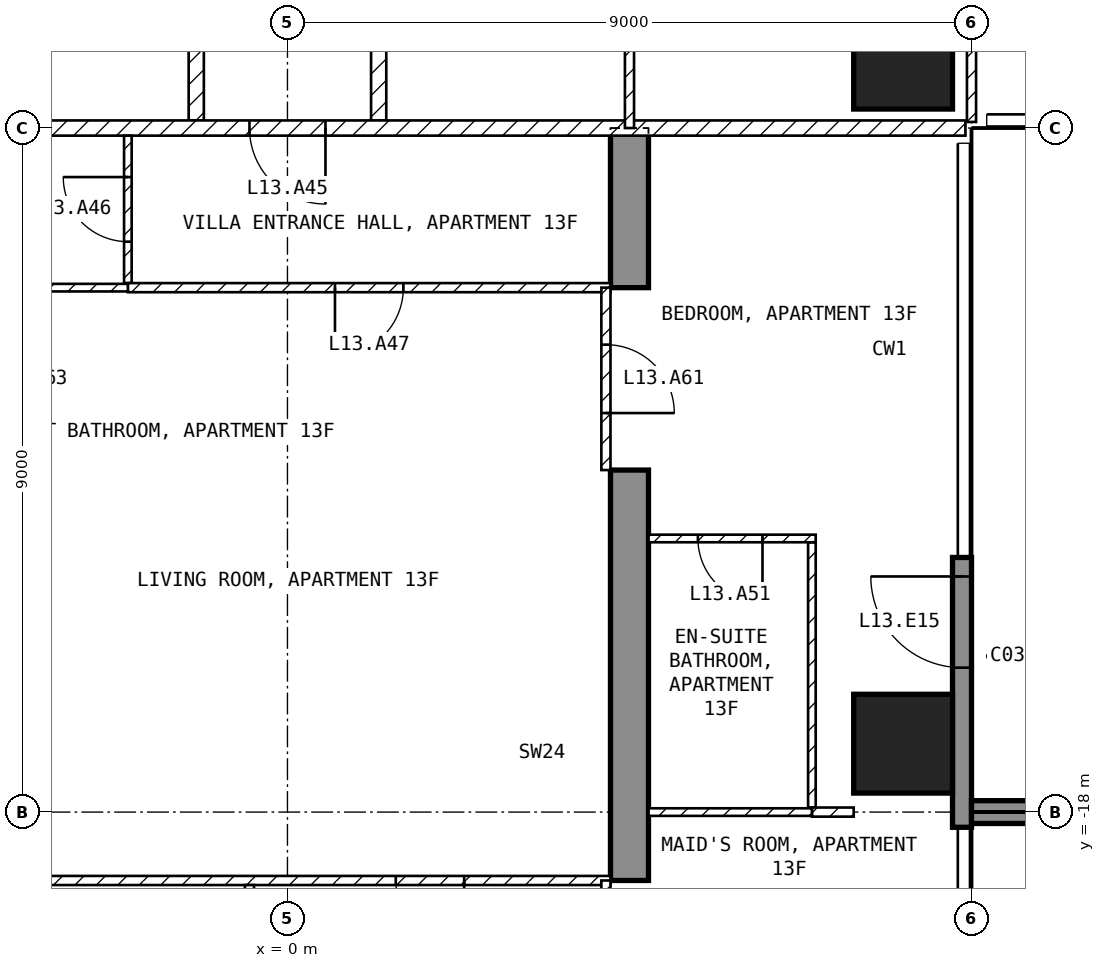
"""IFC4 building model, lengths in metres.
Left out: names, types, materials, properties, quantities, classifications, styles, units other than length and angle.
Written with IfcOpenShell. Run it as: python <this file> out.ifc"""

import sys

from ifc_helpers import new_model, si_unit, direction, frame, frame_2d, origin, origin_2d, place, context, subcontext, project, spatial, polyline, rectangle, outline, extrude, element, fill, save


model = new_model("IFC4")
c1 = context("Model", 3, precision=1e-05, world=origin(), true_north=direction((0.0, 1.0)))
c2 = subcontext(c1, "Body", "Model", "MODEL_VIEW")
j1 = project(units=[si_unit("LENGTHUNIT", "METRE"), si_unit("PLANEANGLEUNIT", "RADIAN")], contexts=[c1])
p1 = place(None, origin())
s1 = spatial("IfcSite", under=j1, at=p1, CompositionType="ELEMENT")
p2 = place(p1, origin())
s2 = spatial("IfcBuilding", under=s1, at=p2, CompositionType="ELEMENT")
p3 = place(p2, frame((0.0, 0.0, 64.5)))
s3 = spatial("IfcBuildingStorey", under=s2, at=p3, CompositionType="ELEMENT", Elevation=64.5)
for number, where, z_axis, x_axis in (
    (1, (8.1, -17.1, -0.25), (0.0, 0.0, 1.0), (1.0, 0.0, 0.0)),
    (2, (8.1, -8.1, -0.25), (0.0, 0.0, 1.0), (1.0, 0.0, 0.0)),
):
    element("IfcColumn", number, at=place(p3, frame(where, z_axis=z_axis, x_axis=x_axis)), inside=s3, PredefinedType="COLUMN", context=c2, shape_type="SweptSolid", body=[
        extrude(rectangle(XDim=1.3, YDim=1.3, at=origin_2d()), origin(), (0.0, 0.0, 1.0), 3.5),
    ])
p4 = place(p3, frame((4.25, -25.45, -0.25), z_axis=(1.0, 0.0, 0.0), x_axis=(0.0, 1.0, 0.0)))
e3 = element("IfcWall", 3, at=p4, inside=s3, PredefinedType="SHEAR", context=c2, shape_type="SweptSolid", body=[
    extrude(outline(polyline([(0.0, 0.0), (4.15, 0.0), (4.15, 2.65), (6.55, 2.65), (6.55, 0.0), (11.95, 0.0), (11.95, 2.65), (14.35, 2.65), (14.35, 0.0), (16.45, 0.0), (16.45, 3.5), (0.0, 3.5), (0.0, 0.0)])), origin(), (0.0, 0.0, 1.0), 0.5),
])
p5 = place(p3, frame((8.875, -18.2, 0.0), z_axis=(0.0, 0.0, 1.0), x_axis=(0.0, 1.0, 0.0)))
e4 = element("IfcWall", 4, at=p5, inside=s3, PredefinedType="SOLIDWALL", context=c2, shape_type="SweptSolid", body=[
    extrude(rectangle(XDim=3.55, YDim=0.25, at=frame_2d((1.775, 0.0))), origin(), (0.0, 0.0, 1.0), 3.25),
])
p6 = place(p5, frame((2.1, 0.0, 0.0)))
e5 = element("IfcOpeningElement", 5, at=p6, cuts=e4, PredefinedType="OPENING", context=c2, shape_type="SweptSolid", body=[
    extrude(rectangle(XDim=1.2, YDim=2.4, at=frame_2d((0.6, 1.2))), frame((0.0, 0.135, 0.0), z_axis=(0.0, -1.0, 0.0), x_axis=(1.0, 0.0, 0.0)), (0.0, 0.0, 1.0), 0.27),
])
p7 = place(p3, frame((9.0, -18.0, 0.0), z_axis=(0.0, 0.0, 1.0), x_axis=(1.0, 0.0, 0.0)))
e6 = element("IfcWall", 6, at=p7, inside=s3, PredefinedType="SOLIDWALL", context=c2, shape_type="SweptSolid", body=[
    extrude(rectangle(XDim=2.7, YDim=0.3, at=frame_2d((1.35, 0.0))), origin(), (0.0, 0.0, 1.0), 3.25),
])
for number, where, z_axis, x_axis in (
    (7, (1.2, -1.3, 0.0), (0.0, 0.0, 1.0), (0.0, -1.0, 0.0)),
    (8, (-1.2, -8.9, 0.0), (0.0, 0.0, 1.0), (0.0, 1.0, 0.0)),
):
    element("IfcWall", number, at=place(p3, frame(where, z_axis=z_axis, x_axis=x_axis)), inside=s3, PredefinedType="PARTITIONING", context=c2, shape_type="SweptSolid", body=[
        extrude(rectangle(XDim=7.6, YDim=0.2, at=frame_2d((3.8, 0.0))), origin(), (0.0, 0.0, 1.0), 3.25),
    ])
p8 = place(p3, frame((8.92, -9.0, 0.0), z_axis=(0.0, 0.0, 1.0), x_axis=(-1.0, 0.0, 0.0)))
e9 = element("IfcWall", 9, at=p8, inside=s3, PredefinedType="PARTITIONING", context=c2, shape_type="SweptSolid", body=[
    extrude(rectangle(XDim=17.84, YDim=0.2, at=frame_2d((8.92, 0.0))), origin(), (0.0, 0.0, 1.0), 3.25),
])
p9 = place(p8, frame((8.42, 0.0, 0.0)))
e10 = element("IfcOpeningElement", 10, at=p9, cuts=e9, PredefinedType="OPENING", context=c2, shape_type="SweptSolid", body=[
    extrude(rectangle(XDim=1.0, YDim=2.1, at=frame_2d((0.5, 1.05))), frame((0.0, 0.11, 0.0), z_axis=(0.0, -1.0, 0.0), x_axis=(1.0, 0.0, 0.0)), (0.0, 0.0, 1.0), 0.22),
])
p10 = place(p3, frame((9.0, -8.92, 0.0), z_axis=(0.0, 0.0, 1.0), x_axis=(0.0, 1.0, 0.0)))
e11 = element("IfcWall", 11, at=p10, inside=s3, PredefinedType="PARTITIONING", context=c2, shape_type="SweptSolid", body=[
    extrude(rectangle(XDim=7.62, YDim=0.12, at=frame_2d((3.81, 0.0))), origin(), (0.0, 0.0, 1.0), 3.25),
])
p11 = place(p10, frame((2.67, 0.0, 0.0)))
e12 = element("IfcOpeningElement", 12, at=p11, cuts=e11, PredefinedType="OPENING", context=c2, shape_type="SweptSolid", body=[
    extrude(rectangle(XDim=0.9, YDim=2.1, at=frame_2d((0.45, 1.05))), frame((0.0, 0.07, 0.0), z_axis=(0.0, -1.0, 0.0), x_axis=(1.0, 0.0, 0.0)), (0.0, 0.0, 1.0), 0.14),
])
p12 = place(p3, frame((4.5, -9.0, 0.0), z_axis=(0.0, 0.0, 1.0), x_axis=(0.0, 1.0, 0.0)))
e13 = element("IfcWall", 13, at=p12, inside=s3, PredefinedType="PARTITIONING", context=c2, shape_type="SweptSolid", body=[
    extrude(rectangle(XDim=7.7, YDim=0.12, at=frame_2d((3.85, 0.0))), origin(), (0.0, 0.0, 1.0), 3.25),
])
p13 = place(p12, frame((3.4, 0.0, 0.0)))
e14 = element("IfcOpeningElement", 14, at=p13, cuts=e13, PredefinedType="OPENING", context=c2, shape_type="SweptSolid", body=[
    extrude(rectangle(XDim=0.9, YDim=2.1, at=frame_2d((0.45, 1.05))), frame((0.0, 0.07, 0.0), z_axis=(0.0, -1.0, 0.0), x_axis=(1.0, 0.0, 0.0)), (0.0, 0.0, 1.0), 0.14),
])
p14 = place(p3, frame((-2.1, -11.04, 0.0), z_axis=(0.0, 0.0, 1.0), x_axis=(0.0, 1.0, 0.0)))
e15 = element("IfcWall", 15, at=p14, inside=s3, PredefinedType="PARTITIONING", context=c2, shape_type="SweptSolid", body=[
    extrude(rectangle(XDim=1.94, YDim=0.1, at=frame_2d((0.97, 0.0))), origin(), (0.0, 0.0, 1.0), 3.25),
])
p15 = place(p14, frame((0.545, 0.0, 0.0)))
e16 = element("IfcOpeningElement", 16, at=p15, cuts=e15, PredefinedType="OPENING", context=c2, shape_type="SweptSolid", body=[
    extrude(rectangle(XDim=0.85, YDim=2.1, at=frame_2d((0.425, 1.05))), frame((0.0, 0.06, 0.0), z_axis=(0.0, -1.0, 0.0), x_axis=(1.0, 0.0, 0.0)), (0.0, 0.0, 1.0), 0.12),
])
p16 = place(p3, frame((4.25, -11.1, 0.0), z_axis=(0.0, 0.0, 1.0), x_axis=(-1.0, 0.0, 0.0)))
e17 = element("IfcWall", 17, at=p16, inside=s3, PredefinedType="PARTITIONING", context=c2, shape_type="SweptSolid", body=[
    extrude(rectangle(XDim=6.35, YDim=0.12, at=frame_2d((3.175, 0.0))), origin(), (0.0, 0.0, 1.0), 3.25),
])
p17 = place(p16, frame((2.725, 0.0, 0.0)))
e18 = element("IfcOpeningElement", 18, at=p17, cuts=e17, PredefinedType="OPENING", context=c2, shape_type="SweptSolid", body=[
    extrude(rectangle(XDim=0.9, YDim=2.1, at=frame_2d((0.45, 1.05))), frame((0.0, 0.07, 0.0), z_axis=(0.0, -1.0, 0.0), x_axis=(1.0, 0.0, 0.0)), (0.0, 0.0, 1.0), 0.14),
])
p18 = place(p3, frame((-2.1, -11.1, 0.0), z_axis=(0.0, 0.0, 1.0), x_axis=(-1.0, 0.0, 0.0)))
e19 = element("IfcWall", 19, at=p18, inside=s3, PredefinedType="PARTITIONING", context=c2, shape_type="SweptSolid", body=[
    extrude(rectangle(XDim=2.15, YDim=0.1, at=frame_2d((1.075, 0.0))), origin(), (0.0, 0.0, 1.0), 3.25),
])
p19 = place(p3, frame((4.25, -18.9, 0.0), z_axis=(0.0, 0.0, 1.0), x_axis=(-1.0, 0.0, 0.0)))
e20 = element("IfcWall", 20, at=p19, inside=s3, PredefinedType="PARTITIONING", context=c2, shape_type="SweptSolid", body=[
    extrude(rectangle(XDim=8.5, YDim=0.12, at=frame_2d((4.25, 0.0))), origin(), (0.0, 0.0, 1.0), 3.25),
])
p20 = place(p19, frame((1.925, 0.0, 0.0)))
e21 = element("IfcOpeningElement", 21, at=p20, cuts=e20, PredefinedType="OPENING", context=c2, shape_type="SweptSolid", body=[
    extrude(rectangle(XDim=0.9, YDim=2.1, at=frame_2d((0.45, 1.05))), frame((0.0, 0.07, 0.0), z_axis=(0.0, -1.0, 0.0), x_axis=(1.0, 0.0, 0.0)), (0.0, 0.0, 1.0), 0.14),
])
p21 = place(p3, frame((-0.5, -23.34, 0.0), z_axis=(0.0, 0.0, 1.0), x_axis=(0.0, 1.0, 0.0)))
e22 = element("IfcWall", 22, at=p21, inside=s3, PredefinedType="PARTITIONING", context=c2, shape_type="SweptSolid", body=[
    extrude(rectangle(XDim=4.38, YDim=0.12, at=frame_2d((2.19, 0.0))), origin(), (0.0, 0.0, 1.0), 3.25),
])
p22 = place(p21, frame((1.74, 0.0, 0.0)))
e23 = element("IfcOpeningElement", 23, at=p22, cuts=e22, PredefinedType="OPENING", context=c2, shape_type="SweptSolid", body=[
    extrude(rectangle(XDim=0.9, YDim=2.1, at=frame_2d((0.45, 1.05))), frame((0.0, 0.07, 0.0), z_axis=(0.0, -1.0, 0.0), x_axis=(1.0, 0.0, 0.0)), (0.0, 0.0, 1.0), 0.14),
])
p23 = place(p3, frame((6.9, -17.94, 0.0), z_axis=(0.0, 0.0, 1.0), x_axis=(0.0, 1.0, 0.0)))
e24 = element("IfcWall", 24, at=p23, inside=s3, PredefinedType="PARTITIONING", context=c2, shape_type="SweptSolid", body=[
    extrude(rectangle(XDim=3.49, YDim=0.1, at=frame_2d((1.745, 0.0))), origin(), (0.0, 0.0, 1.0), 3.25),
])
p24 = place(p3, frame((6.95, -14.4, 0.0), z_axis=(0.0, 0.0, 1.0), x_axis=(-1.0, 0.0, 0.0)))
e25 = element("IfcWall", 25, at=p24, inside=s3, PredefinedType="PARTITIONING", context=c2, shape_type="SweptSolid", body=[
    extrude(rectangle(XDim=2.2, YDim=0.1, at=frame_2d((1.1, 0.0))), origin(), (0.0, 0.0, 1.0), 3.25),
])
p25 = place(p24, frame((0.7, 0.0, 0.0)))
e26 = element("IfcOpeningElement", 26, at=p25, cuts=e25, PredefinedType="OPENING", context=c2, shape_type="SweptSolid", body=[
    extrude(rectangle(XDim=0.85, YDim=2.1, at=frame_2d((0.425, 1.05))), frame((0.0, 0.06, 0.0), z_axis=(0.0, -1.0, 0.0), x_axis=(1.0, 0.0, 0.0)), (0.0, 0.0, 1.0), 0.12),
])
p26 = place(p3, frame((7.45, -18.0, 0.0), z_axis=(0.0, 0.0, 1.0), x_axis=(-1.0, 0.0, 0.0)))
e27 = element("IfcWall", 27, at=p26, inside=s3, PredefinedType="PARTITIONING", context=c2, shape_type="SweptSolid", body=[
    extrude(rectangle(XDim=0.55, YDim=0.12, at=frame_2d((0.275, 0.0))), origin(), (0.0, 0.0, 1.0), 3.25),
])
p27 = place(p3, frame((6.9, -18.0, 0.0), z_axis=(0.0, 0.0, 1.0), x_axis=(-1.0, 0.0, 0.0)))
e28 = element("IfcWall", 28, at=p27, inside=s3, PredefinedType="PARTITIONING", context=c2, shape_type="SweptSolid", body=[
    extrude(rectangle(XDim=2.15, YDim=0.1, at=frame_2d((1.075, 0.0))), origin(), (0.0, 0.0, 1.0), 3.25),
])
p28 = place(p3, frame((4.19, -11.1, 0.0), z_axis=(0.0, 0.0, 1.0), x_axis=(0.0, -1.0, 0.0)))
e29 = element("IfcWall", 29, at=p28, inside=s3, PredefinedType="PARTITIONING", context=c2, shape_type="SweptSolid", body=[
    extrude(rectangle(XDim=2.4, YDim=0.12, at=frame_2d((1.2, 0.0))), origin(), (0.0, 0.0, 1.0), 2.4),
])
p29 = place(p28, frame((0.75, 0.0, 0.0)))
e30 = element("IfcOpeningElement", 30, at=p29, cuts=e29, PredefinedType="OPENING", context=c2, shape_type="SweptSolid", body=[
    extrude(rectangle(XDim=0.9, YDim=2.1, at=frame_2d((0.45, 1.05))), frame((0.0, 0.07, 0.0), z_axis=(0.0, -1.0, 0.0), x_axis=(1.0, 0.0, 0.0)), (0.0, 0.0, 1.0), 0.14),
])
p30 = place(p3, frame((4.19, -18.9, 0.0), z_axis=(0.0, 0.0, 1.0), x_axis=(0.0, -1.0, 0.0)))
e31 = element("IfcWall", 31, at=p30, inside=s3, PredefinedType="PARTITIONING", context=c2, shape_type="SweptSolid", body=[
    extrude(rectangle(XDim=2.4, YDim=0.12, at=frame_2d((1.2, 0.0))), origin(), (0.0, 0.0, 1.0), 2.4),
])
p31 = place(p30, frame((0.75, 0.0, 0.0)))
e32 = element("IfcOpeningElement", 32, at=p31, cuts=e31, PredefinedType="OPENING", context=c2, shape_type="SweptSolid", body=[
    extrude(rectangle(XDim=0.9, YDim=2.1, at=frame_2d((0.45, 1.05))), frame((0.0, 0.07, 0.0), z_axis=(0.0, -1.0, 0.0), x_axis=(1.0, 0.0, 0.0)), (0.0, 0.0, 1.0), 0.14),
])
p32 = place(p6, origin())
e33 = element("IfcDoor", 33, at=p32, inside=s3, OperationType="SINGLE_SWING_RIGHT", PredefinedType="DOOR", context=c2, shape_type="SweptSolid", body=[
    extrude(rectangle(XDim=1.2, YDim=2.4, at=frame_2d((0.6, 1.2))), frame((0.0, 0.025, 0.0), z_axis=(0.0, -1.0, 0.0), x_axis=(1.0, 0.0, 0.0)), (0.0, 0.0, 1.0), 0.05),
])
fill(e5, e33)
p33 = place(p9, origin())
e34 = element("IfcDoor", 34, at=p33, inside=s3, OperationType="SINGLE_SWING_LEFT", PredefinedType="DOOR", context=c2, shape_type="SweptSolid", body=[
    extrude(rectangle(XDim=1.0, YDim=2.1, at=frame_2d((0.5, 1.05))), frame((0.0, 0.025, 0.0), z_axis=(0.0, -1.0, 0.0), x_axis=(1.0, 0.0, 0.0)), (0.0, 0.0, 1.0), 0.05),
])
fill(e10, e34)
p34 = place(p15, origin())
e35 = element("IfcDoor", 35, at=p34, inside=s3, OperationType="SINGLE_SWING_RIGHT", PredefinedType="DOOR", context=c2, shape_type="SweptSolid", body=[
    extrude(rectangle(XDim=0.85, YDim=2.1, at=frame_2d((0.425, 1.05))), frame((0.0, 0.025, 0.0), z_axis=(0.0, -1.0, 0.0), x_axis=(1.0, 0.0, 0.0)), (0.0, 0.0, 1.0), 0.05),
])
fill(e16, e35)
p35 = place(p17, origin())
e36 = element("IfcDoor", 36, at=p35, inside=s3, OperationType="SINGLE_SWING_RIGHT", PredefinedType="DOOR", context=c2, shape_type="SweptSolid", body=[
    extrude(rectangle(XDim=0.9, YDim=2.1, at=frame_2d((0.45, 1.05))), frame((0.0, 0.025, 0.0), z_axis=(0.0, -1.0, 0.0), x_axis=(1.0, 0.0, 0.0)), (0.0, 0.0, 1.0), 0.05),
])
fill(e18, e36)
p36 = place(p20, origin())
e37 = element("IfcDoor", 37, at=p36, inside=s3, OperationType="SINGLE_SWING_LEFT", PredefinedType="DOOR", context=c2, shape_type="SweptSolid", body=[
    extrude(rectangle(XDim=0.9, YDim=2.1, at=frame_2d((0.45, 1.05))), frame((0.0, 0.025, 0.0), z_axis=(0.0, -1.0, 0.0), x_axis=(1.0, 0.0, 0.0)), (0.0, 0.0, 1.0), 0.05),
])
fill(e21, e37)
p37 = place(p25, origin())
e38 = element("IfcDoor", 38, at=p37, inside=s3, OperationType="SINGLE_SWING_LEFT", PredefinedType="DOOR", context=c2, shape_type="SweptSolid", body=[
    extrude(rectangle(XDim=0.85, YDim=2.1, at=frame_2d((0.425, 1.05))), frame((0.0, 0.025, 0.0), z_axis=(0.0, -1.0, 0.0), x_axis=(1.0, 0.0, 0.0)), (0.0, 0.0, 1.0), 0.05),
])
fill(e26, e38)
p38 = place(p29, origin())
e39 = element("IfcDoor", 39, at=p38, inside=s3, OperationType="SINGLE_SWING_RIGHT", PredefinedType="DOOR", context=c2, shape_type="SweptSolid", body=[
    extrude(rectangle(XDim=0.9, YDim=2.1, at=frame_2d((0.45, 1.05))), frame((0.0, 0.025, 0.0), z_axis=(0.0, -1.0, 0.0), x_axis=(1.0, 0.0, 0.0)), (0.0, 0.0, 1.0), 0.05),
])
fill(e30, e39)
save(model, sys.argv[1])
